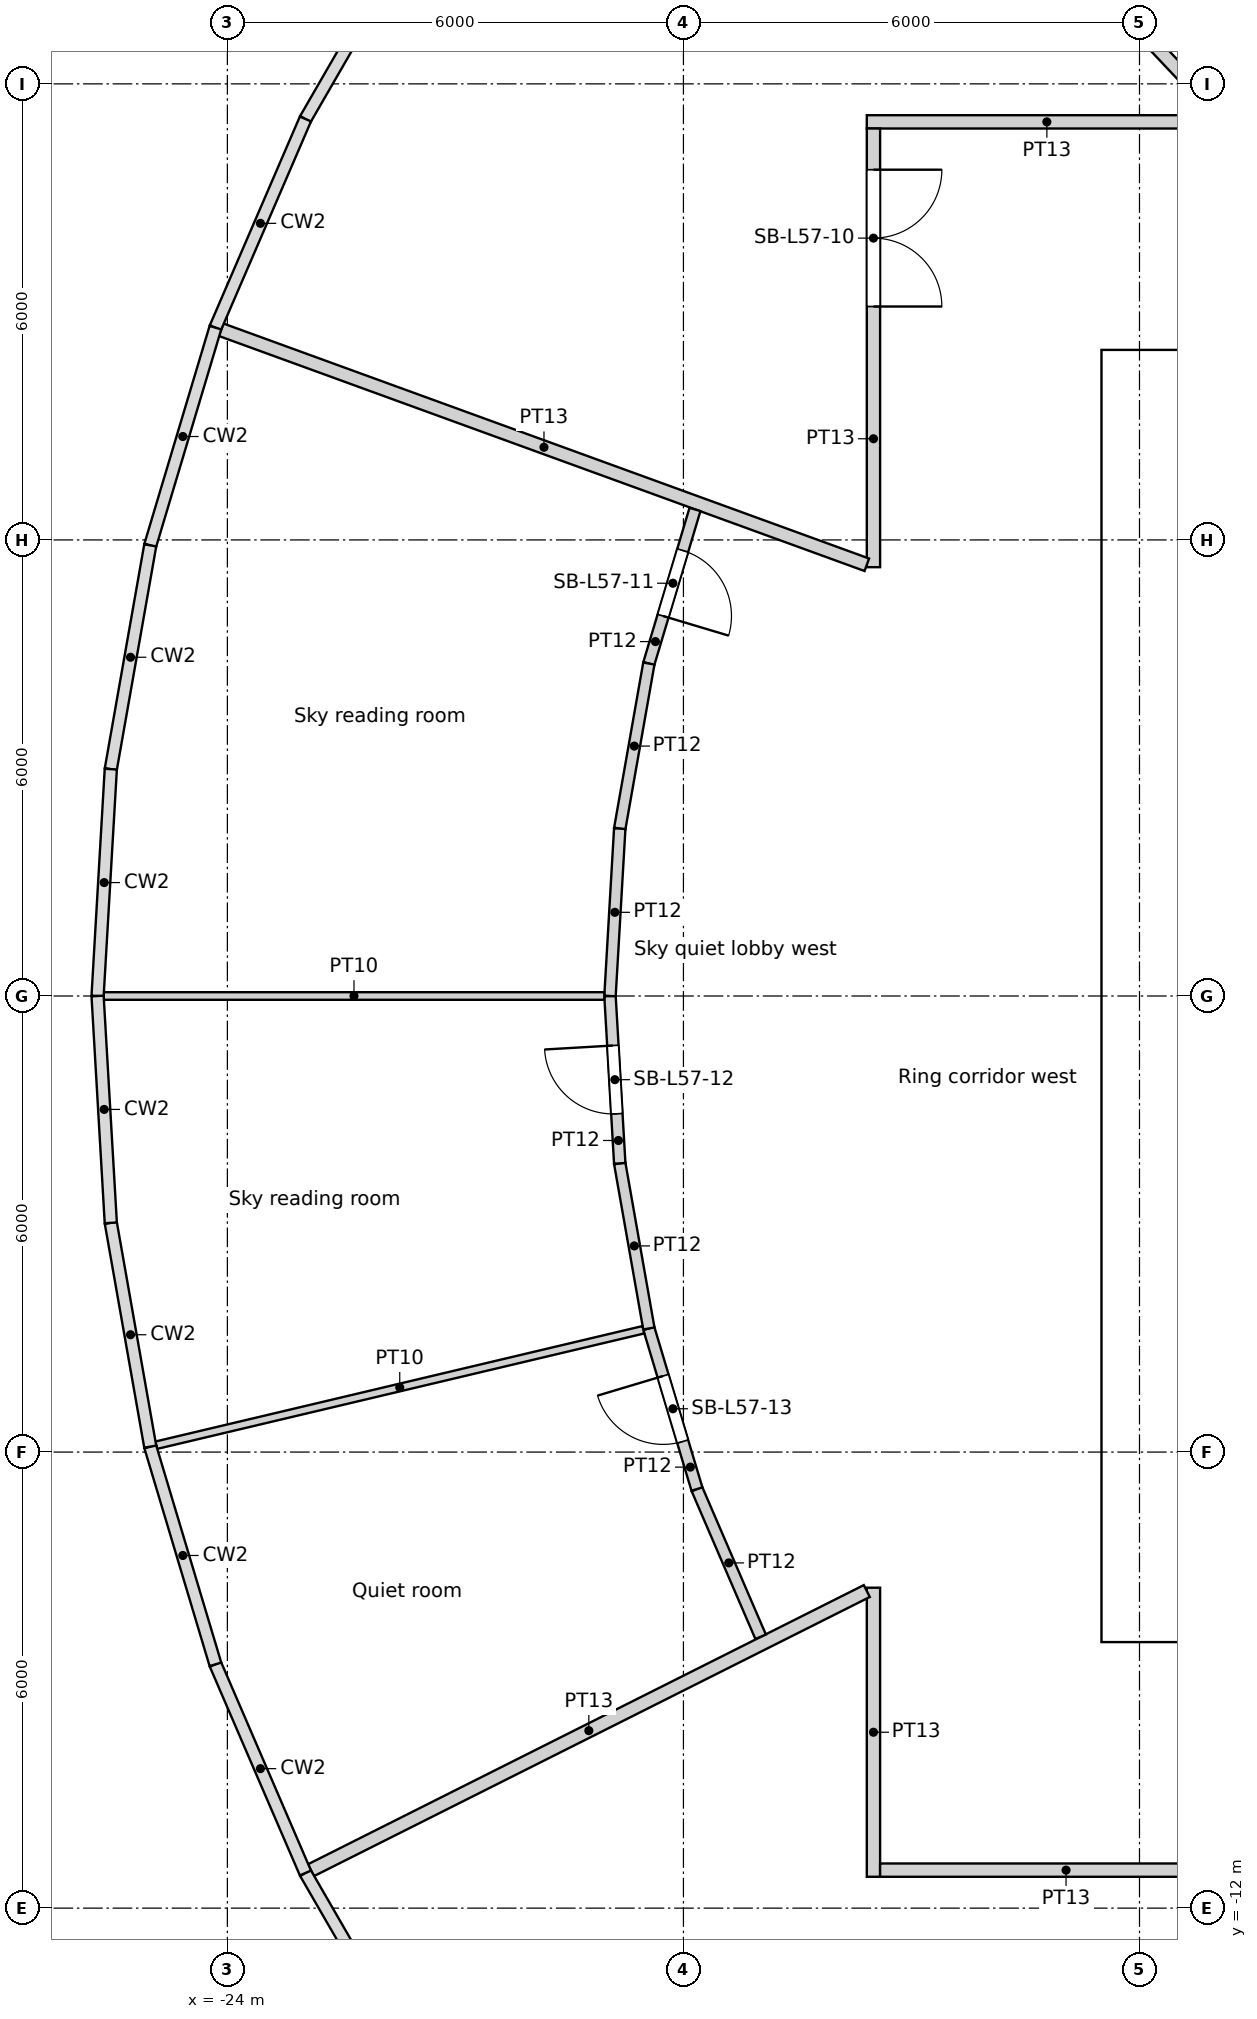
"""IFC4 building model, lengths in metres.
Left out: names, types, materials, properties, quantities, classifications, styles, units other than length and angle.
Written with IfcOpenShell. Run it as: python <this file> out.ifc"""

import sys

from ifc_helpers import new_model, si_unit, direction, frame, frame_2d, origin, origin_2d, place, context, subcontext, project, spatial, rectangle, circle, extrude, element, fill, save


model = new_model("IFC4")
c1 = context("Model", 3, precision=1e-05, world=origin(), true_north=direction((0.0, 1.0)))
c2 = subcontext(c1, "Body", "Model", "MODEL_VIEW")
j1 = project(units=[si_unit("LENGTHUNIT", "METRE"), si_unit("PLANEANGLEUNIT", "RADIAN")], contexts=[c1])
p1 = place(None, origin())
s1 = spatial("IfcSite", under=j1, at=p1, CompositionType="ELEMENT")
p2 = place(p1, origin())
s2 = spatial("IfcBuilding", under=s1, at=p2, CompositionType="ELEMENT")
p3 = place(p2, frame((0.0, 0.0, 219.6)))
s3 = spatial("IfcBuildingStorey", under=s2, at=p3, CompositionType="ELEMENT", Elevation=219.6)
for number, where, z_axis, x_axis in (
    (1, (-23.067, 8.396, 0.0), (0.0, 0.0, 1.0), (1.0, 0.0, 0.0)),
    (2, (-24.382, 2.85, 0.0), (0.0, 0.0, 1.0), (1.0, 0.0, 0.0)),
    (3, (-24.382, -2.85, 0.0), (0.0, 0.0, 1.0), (1.0, 0.0, 0.0)),
    (4, (-23.067, -8.396, 0.0), (0.0, 0.0, 1.0), (1.0, 0.0, 0.0)),
):
    element("IfcColumn", number, at=place(p3, frame(where, z_axis=z_axis, x_axis=x_axis)), inside=s3, PredefinedType="COLUMN", context=c2, shape_type="SweptSolid", body=[
        extrude(circle(Radius=0.6, at=origin_2d()), origin(), (0.0, 0.0, 1.0), 5.4),
    ])
for number, where, z_axis, x_axis in (
    (5, (-13.798, 12.802, 0.0), (0.0, 0.0, 1.0), (1.0, 0.0, 0.0)),
    (6, (-16.958, 8.167, 0.0), (0.0, 0.0, 1.0), (1.0, 0.0, 0.0)),
    (7, (-18.612, 2.805, 0.0), (0.0, 0.0, 1.0), (1.0, 0.0, 0.0)),
    (8, (-18.612, -2.805, 0.0), (0.0, 0.0, 1.0), (1.0, 0.0, 0.0)),
    (9, (-16.958, -8.167, 0.0), (0.0, 0.0, 1.0), (1.0, 0.0, 0.0)),
    (10, (-13.798, -12.802, 0.0), (0.0, 0.0, 1.0), (1.0, 0.0, 0.0)),
):
    element("IfcColumn", number, at=place(p3, frame(where, z_axis=z_axis, x_axis=x_axis)), inside=s3, PredefinedType="COLUMN", context=c2, shape_type="SweptSolid", body=[
        extrude(circle(Radius=0.65, at=origin_2d()), origin(), (0.0, 0.0, 1.0), 5.4),
    ])
p4 = place(p3, frame((-12.5, -8.05, 0.0), z_axis=(0.0, 0.0, 1.0), x_axis=(1.0, 0.0, 0.0)))
e11 = element("IfcWall", 11, at=p4, inside=s3, PredefinedType="SOLIDWALL", context=c2, shape_type="SweptSolid", body=[
    extrude(rectangle(XDim=25.0, YDim=0.9, at=frame_2d((12.5, 0.0))), origin(), (0.0, 0.0, 1.0), 5.4),
])
p5 = place(p4, frame((13.4, 0.0, 0.0)))
e12 = element("IfcOpeningElement", 12, at=p5, cuts=e11, PredefinedType="OPENING", context=c2, shape_type="SweptSolid", body=[
    extrude(rectangle(XDim=1.0, YDim=2.1, at=frame_2d((0.5, 1.05))), frame((0.0, 0.45, 0.0), z_axis=(0.0, -1.0, 0.0), x_axis=(1.0, 0.0, 0.0)), (0.0, 0.0, 1.0), 0.9),
])
p6 = place(p4, frame((8.3, 0.0, 0.0)))
e13 = element("IfcOpeningElement", 13, at=p6, cuts=e11, PredefinedType="OPENING", context=c2, shape_type="SweptSolid", body=[
    extrude(rectangle(XDim=1.8, YDim=2.1, at=frame_2d((0.9, 1.05))), frame((0.0, 0.45, 0.0), z_axis=(0.0, -1.0, 0.0), x_axis=(1.0, 0.0, 0.0)), (0.0, 0.0, 1.0), 0.9),
])
p7 = place(p4, frame((14.9, 0.0, 0.0)))
e14 = element("IfcOpeningElement", 14, at=p7, cuts=e11, PredefinedType="OPENING", context=c2, shape_type="SweptSolid", body=[
    extrude(rectangle(XDim=1.8, YDim=2.1, at=frame_2d((0.9, 1.05))), frame((0.0, 0.45, 0.0), z_axis=(0.0, -1.0, 0.0), x_axis=(1.0, 0.0, 0.0)), (0.0, 0.0, 1.0), 0.9),
])
p8 = place(p3, frame((-12.5, 8.05, 0.0), z_axis=(0.0, 0.0, 1.0), x_axis=(1.0, 0.0, 0.0)))
e15 = element("IfcWall", 15, at=p8, inside=s3, PredefinedType="SOLIDWALL", context=c2, shape_type="SweptSolid", body=[
    extrude(rectangle(XDim=25.0, YDim=0.9, at=frame_2d((12.5, 0.0))), origin(), (0.0, 0.0, 1.0), 5.4),
])
p9 = place(p8, frame((8.3, 0.0, 0.0)))
e16 = element("IfcOpeningElement", 16, at=p9, cuts=e15, PredefinedType="OPENING", context=c2, shape_type="SweptSolid", body=[
    extrude(rectangle(XDim=1.8, YDim=2.1, at=frame_2d((0.9, 1.05))), frame((0.0, 0.45, 0.0), z_axis=(0.0, -1.0, 0.0), x_axis=(1.0, 0.0, 0.0)), (0.0, 0.0, 1.0), 0.9),
])
p10 = place(p3, frame((-12.05, -7.6, 0.0), z_axis=(0.0, 0.0, 1.0), x_axis=(0.0, 1.0, 0.0)))
e17 = element("IfcWall", 17, at=p10, inside=s3, PredefinedType="SOLIDWALL", context=c2, shape_type="SweptSolid", body=[
    extrude(rectangle(XDim=15.2, YDim=0.9, at=frame_2d((7.6, 0.0))), origin(), (0.0, 0.0, 1.0), 5.4),
])
p11 = place(p10, frame((7.1, 0.0, 0.0)))
e18 = element("IfcOpeningElement", 18, at=p11, cuts=e17, PredefinedType="OPENING", context=c2, shape_type="SweptSolid", body=[
    extrude(rectangle(XDim=1.0, YDim=2.1, at=frame_2d((0.5, 1.05))), frame((0.0, 0.45, 0.0), z_axis=(0.0, -1.0, 0.0), x_axis=(1.0, 0.0, 0.0)), (0.0, 0.0, 1.0), 0.9),
])
p12 = place(p3, frame((-11.6, -4.55, 0.0), z_axis=(0.0, 0.0, 1.0), x_axis=(1.0, 0.0, 0.0)))
e19 = element("IfcWall", 19, at=p12, inside=s3, PredefinedType="SOLIDWALL", context=c2, shape_type="SweptSolid", body=[
    extrude(rectangle(XDim=2.4, YDim=0.3, at=frame_2d((1.2, 0.0))), origin(), (0.0, 0.0, 1.0), 4.9),
])
p13 = place(p12, frame((0.65, 0.0, 0.0)))
e20 = element("IfcOpeningElement", 20, at=p13, cuts=e19, PredefinedType="OPENING", context=c2, shape_type="SweptSolid", body=[
    extrude(rectangle(XDim=1.1, YDim=2.1, at=frame_2d((0.55, 1.05))), frame((0.0, 0.15, 0.0), z_axis=(0.0, -1.0, 0.0), x_axis=(1.0, 0.0, 0.0)), (0.0, 0.0, 1.0), 0.3),
])
p14 = place(p3, frame((-11.6, 4.55, 0.0), z_axis=(0.0, 0.0, 1.0), x_axis=(1.0, 0.0, 0.0)))
e21 = element("IfcWall", 21, at=p14, inside=s3, PredefinedType="SOLIDWALL", context=c2, shape_type="SweptSolid", body=[
    extrude(rectangle(XDim=2.4, YDim=0.3, at=frame_2d((1.2, 0.0))), origin(), (0.0, 0.0, 1.0), 4.9),
])
p15 = place(p14, frame((0.65, 0.0, 0.0)))
e22 = element("IfcOpeningElement", 22, at=p15, cuts=e21, PredefinedType="OPENING", context=c2, shape_type="SweptSolid", body=[
    extrude(rectangle(XDim=1.1, YDim=2.1, at=frame_2d((0.55, 1.05))), frame((0.0, 0.15, 0.0), z_axis=(0.0, -1.0, 0.0), x_axis=(1.0, 0.0, 0.0)), (0.0, 0.0, 1.0), 0.3),
])
p16 = place(p3, frame((-25.627, 0.0, 0.0), z_axis=(0.0, 0.0, 1.0), x_axis=(1.0, 0.0, 0.0)))
e23 = element("IfcWall", 23, at=p16, inside=s3, PredefinedType="PARTITIONING", context=c2, shape_type="SweptSolid", body=[
    extrude(rectangle(XDim=6.586, YDim=0.1, at=frame_2d((3.293, 0.0))), origin(), (0.0, 0.0, 1.0), 4.1),
])
p17 = place(p3, frame((-24.937, -5.91, 0.0), z_axis=(0.0, 0.0, 1.0), x_axis=(0.973037610496, 0.230646501296, 0.0)))
e24 = element("IfcWall", 24, at=p17, inside=s3, PredefinedType="PARTITIONING", context=c2, shape_type="SweptSolid", body=[
    extrude(rectangle(XDim=6.586, YDim=0.1, at=frame_2d((3.293, 0.0))), origin(), (0.0, 0.0, 1.0), 4.1),
])
p18 = place(p3, frame((-24.082, 8.765, 0.0), z_axis=(0.0, 0.0, 1.0), x_axis=(0.939689290675, -0.342029292591, 0.0)))
e25 = element("IfcWall", 25, at=p18, inside=s3, PredefinedType="PARTITIONING", context=c2, shape_type="SweptSolid", body=[
    extrude(rectangle(XDim=9.04, YDim=0.175, at=frame_2d((4.52, 0.0))), origin(), (0.0, 0.0, 1.0), 4.1),
])
p19 = place(p3, frame((-22.902, -11.502, 0.0), z_axis=(0.0, 0.0, 1.0), x_axis=(0.893632344916, 0.448799768404, 0.0)))
e26 = element("IfcWall", 26, at=p19, inside=s3, PredefinedType="PARTITIONING", context=c2, shape_type="SweptSolid", body=[
    extrude(rectangle(XDim=8.185, YDim=0.175, at=frame_2d((4.092, 0.0))), origin(), (0.0, 0.0, 1.0), 4.1),
])
p20 = place(p3, frame((-18.838, -2.202, 0.0), z_axis=(0.0, 0.0, 1.0), x_axis=(-0.058112072782, 0.998310065559, 0.0)))
e27 = element("IfcWall", 27, at=p20, inside=s3, PredefinedType="PARTITIONING", context=c2, shape_type="SweptSolid", body=[
    extrude(rectangle(XDim=2.206, YDim=0.15, at=frame_2d((1.103, 0.0))), origin(), (0.0, 0.0, 1.0), 4.1),
])
p21 = place(p20, frame((0.653, 0.0, 0.0)))
e28 = element("IfcOpeningElement", 28, at=p21, cuts=e27, PredefinedType="OPENING", context=c2, shape_type="SweptSolid", body=[
    extrude(rectangle(XDim=0.9, YDim=2.1, at=frame_2d((0.45, 1.05))), frame((0.0, 0.075, 0.0), z_axis=(0.0, -1.0, 0.0), x_axis=(1.0, 0.0, 0.0)), (0.0, 0.0, 1.0), 0.15),
])
p22 = place(p3, frame((-18.838, -2.202, 0.0), z_axis=(0.0, 0.0, 1.0), x_axis=(0.173690605338, -0.984800270927, 0.0)))
e29 = element("IfcWall", 29, at=p22, inside=s3, PredefinedType="PARTITIONING", context=c2, shape_type="SweptSolid", body=[
    extrude(rectangle(XDim=2.205, YDim=0.15, at=frame_2d((1.103, 0.0))), origin(), (0.0, 0.0, 1.0), 4.1),
])
p23 = place(p3, frame((-18.838, 2.202, 0.0), z_axis=(0.0, 0.0, 1.0), x_axis=(-0.058112072782, -0.998310065559, 0.0)))
e30 = element("IfcWall", 30, at=p23, inside=s3, PredefinedType="PARTITIONING", context=c2, shape_type="SweptSolid", body=[
    extrude(rectangle(XDim=2.206, YDim=0.15, at=frame_2d((1.103, 0.0))), origin(), (0.0, 0.0, 1.0), 4.1),
])
p24 = place(p3, frame((-17.822, -6.487, 0.0), z_axis=(0.0, 0.0, 1.0), x_axis=(-0.286789325677, 0.957993675698, 0.0)))
e31 = element("IfcWall", 31, at=p24, inside=s3, PredefinedType="PARTITIONING", context=c2, shape_type="SweptSolid", body=[
    extrude(rectangle(XDim=2.206, YDim=0.15, at=frame_2d((1.103, 0.0))), origin(), (0.0, 0.0, 1.0), 4.1),
])
p25 = place(p24, frame((0.653, 0.0, 0.0)))
e32 = element("IfcOpeningElement", 32, at=p25, cuts=e31, PredefinedType="OPENING", context=c2, shape_type="SweptSolid", body=[
    extrude(rectangle(XDim=0.9, YDim=2.1, at=frame_2d((0.45, 1.05))), frame((0.0, 0.075, 0.0), z_axis=(0.0, -1.0, 0.0), x_axis=(1.0, 0.0, 0.0)), (0.0, 0.0, 1.0), 0.15),
])
p26 = place(p3, frame((-18.455, 4.374, 0.0), z_axis=(0.0, 0.0, 1.0), x_axis=(-0.173690605338, -0.984800270927, 0.0)))
e33 = element("IfcWall", 33, at=p26, inside=s3, PredefinedType="PARTITIONING", context=c2, shape_type="SweptSolid", body=[
    extrude(rectangle(XDim=2.205, YDim=0.15, at=frame_2d((1.103, 0.0))), origin(), (0.0, 0.0, 1.0), 4.1),
])
p27 = place(p3, frame((-17.822, -6.487, 0.0), z_axis=(0.0, 0.0, 1.0), x_axis=(0.396049140971, -0.918229316639, 0.0)))
e34 = element("IfcWall", 34, at=p27, inside=s3, PredefinedType="PARTITIONING", context=c2, shape_type="SweptSolid", body=[
    extrude(rectangle(XDim=2.116, YDim=0.15, at=frame_2d((1.058, 0.0))), origin(), (0.0, 0.0, 1.0), 4.1),
])
p28 = place(p3, frame((-18.455, 4.374, 0.0), z_axis=(0.0, 0.0, 1.0), x_axis=(0.286754978778, 0.95800395727, 0.0)))
e35 = element("IfcWall", 35, at=p28, inside=s3, PredefinedType="PARTITIONING", context=c2, shape_type="SweptSolid", body=[
    extrude(rectangle(XDim=2.116, YDim=0.15, at=frame_2d((1.058, 0.0))), origin(), (0.0, 0.0, 1.0), 4.1),
])
p29 = place(p28, frame((0.653, 0.0, 0.0)))
e36 = element("IfcOpeningElement", 36, at=p29, cuts=e35, PredefinedType="OPENING", context=c2, shape_type="SweptSolid", body=[
    extrude(rectangle(XDim=0.9, YDim=2.1, at=frame_2d((0.45, 1.05))), frame((0.0, 0.075, 0.0), z_axis=(0.0, -1.0, 0.0), x_axis=(1.0, 0.0, 0.0)), (0.0, 0.0, 1.0), 0.15),
])
p30 = place(p3, frame((-17.587, 18.641, 0.0), z_axis=(0.0, 0.0, 1.0), x_axis=(0.686237518372, -0.727377528096, 0.0)))
e37 = element("IfcWall", 37, at=p30, inside=s3, PredefinedType="PARTITIONING", context=c2, shape_type="SweptSolid", body=[
    extrude(rectangle(XDim=9.697, YDim=0.175, at=frame_2d((4.848, 0.0))), origin(), (0.0, 0.0, 1.0), 4.1),
])
p31 = place(p3, frame((-6.74, -11.5, 0.0), z_axis=(0.0, 0.0, 1.0), x_axis=(-1.0, 0.0, 0.0)))
e38 = element("IfcWall", 38, at=p31, inside=s3, PredefinedType="PARTITIONING", context=c2, shape_type="SweptSolid", body=[
    extrude(rectangle(XDim=8.672, YDim=0.175, at=frame_2d((4.336, 0.0))), origin(), (0.0, 0.0, 1.0), 4.1),
])
p32 = place(p31, frame((1.929, 0.0, 0.0)))
e39 = element("IfcOpeningElement", 39, at=p32, cuts=e38, PredefinedType="OPENING", context=c2, shape_type="SweptSolid", body=[
    extrude(rectangle(XDim=1.8, YDim=2.4, at=frame_2d((0.9, 1.2))), frame((0.0, 0.087, 0.0), z_axis=(0.0, -1.0, 0.0), x_axis=(1.0, 0.0, 0.0)), (0.0, 0.0, 1.0), 0.175),
])
p33 = place(p3, frame((-15.5, -7.784, 0.0), z_axis=(0.0, 0.0, 1.0), x_axis=(0.0, -1.0, 0.0)))
e40 = element("IfcWall", 40, at=p33, inside=s3, PredefinedType="PARTITIONING", context=c2, shape_type="SweptSolid", body=[
    extrude(rectangle(XDim=3.803, YDim=0.175, at=frame_2d((1.901, 0.0))), origin(), (0.0, 0.0, 1.0), 4.1),
])
p34 = place(p3, frame((-15.5, 5.642, 0.0), z_axis=(0.0, 0.0, 1.0), x_axis=(0.0, 1.0, 0.0)))
e41 = element("IfcWall", 41, at=p34, inside=s3, PredefinedType="PARTITIONING", context=c2, shape_type="SweptSolid", body=[
    extrude(rectangle(XDim=5.771, YDim=0.175, at=frame_2d((2.885, 0.0))), origin(), (0.0, 0.0, 1.0), 4.1),
])
p35 = place(p34, frame((3.429, 0.0, 0.0)))
e42 = element("IfcOpeningElement", 42, at=p35, cuts=e41, PredefinedType="OPENING", context=c2, shape_type="SweptSolid", body=[
    extrude(rectangle(XDim=1.8, YDim=2.4, at=frame_2d((0.9, 1.2))), frame((0.0, 0.087, 0.0), z_axis=(0.0, -1.0, 0.0), x_axis=(1.0, 0.0, 0.0)), (0.0, 0.0, 1.0), 0.175),
])
p36 = place(p3, frame((-12.814, -22.194, 0.0), z_axis=(0.0, 0.0, 1.0), x_axis=(0.500004836318, 0.866022611517, 0.0)))
e43 = element("IfcWall", 43, at=p36, inside=s3, PredefinedType="PARTITIONING", context=c2, shape_type="SweptSolid", body=[
    extrude(rectangle(XDim=12.349, YDim=0.175, at=frame_2d((6.174, 0.0))), origin(), (0.0, 0.0, 1.0), 4.1),
])
p37 = place(p3, frame((-10.85, 11.5, 0.0), z_axis=(0.0, 0.0, 1.0), x_axis=(-1.0, 0.0, 0.0)))
e44 = element("IfcWall", 44, at=p37, inside=s3, PredefinedType="PARTITIONING", context=c2, shape_type="SweptSolid", body=[
    extrude(rectangle(XDim=4.738, YDim=0.175, at=frame_2d((2.369, 0.0))), origin(), (0.0, 0.0, 1.0), 4.1),
])
p38 = place(p11, origin())
e45 = element("IfcDoor", 45, at=p38, inside=s3, OperationType="DOUBLE_DOOR_SINGLE_SWING", PredefinedType="DOOR", context=c2, shape_type="SweptSolid", body=[
    extrude(rectangle(XDim=1.0, YDim=2.1, at=frame_2d((0.5, 1.05))), frame((0.0, 0.025, 0.0), z_axis=(0.0, -1.0, 0.0), x_axis=(1.0, 0.0, 0.0)), (0.0, 0.0, 1.0), 0.05),
])
fill(e18, e45)
p39 = place(p35, origin())
e46 = element("IfcDoor", 46, at=p39, inside=s3, OperationType="DOUBLE_DOOR_SINGLE_SWING", PredefinedType="DOOR", context=c2, shape_type="SweptSolid", body=[
    extrude(rectangle(XDim=1.8, YDim=2.4, at=frame_2d((0.9, 1.2))), frame((0.0, 0.025, 0.0), z_axis=(0.0, -1.0, 0.0), x_axis=(1.0, 0.0, 0.0)), (0.0, 0.0, 1.0), 0.05),
])
fill(e42, e46)
p40 = place(p29, origin())
e47 = element("IfcDoor", 47, at=p40, inside=s3, OperationType="SINGLE_SWING_RIGHT", PredefinedType="DOOR", context=c2, shape_type="SweptSolid", body=[
    extrude(rectangle(XDim=0.9, YDim=2.1, at=frame_2d((0.45, 1.05))), frame((0.0, 0.025, 0.0), z_axis=(0.0, -1.0, 0.0), x_axis=(1.0, 0.0, 0.0)), (0.0, 0.0, 1.0), 0.05),
])
fill(e36, e47)
p41 = place(p21, origin())
e48 = element("IfcDoor", 48, at=p41, inside=s3, OperationType="SINGLE_SWING_RIGHT", PredefinedType="DOOR", context=c2, shape_type="SweptSolid", body=[
    extrude(rectangle(XDim=0.9, YDim=2.1, at=frame_2d((0.45, 1.05))), frame((0.0, 0.025, 0.0), z_axis=(0.0, -1.0, 0.0), x_axis=(1.0, 0.0, 0.0)), (0.0, 0.0, 1.0), 0.05),
])
fill(e28, e48)
p42 = place(p25, origin())
e49 = element("IfcDoor", 49, at=p42, inside=s3, OperationType="SINGLE_SWING_RIGHT", PredefinedType="DOOR", context=c2, shape_type="SweptSolid", body=[
    extrude(rectangle(XDim=0.9, YDim=2.1, at=frame_2d((0.45, 1.05))), frame((0.0, 0.025, 0.0), z_axis=(0.0, -1.0, 0.0), x_axis=(1.0, 0.0, 0.0)), (0.0, 0.0, 1.0), 0.05),
])
fill(e32, e49)
save(model, sys.argv[1])
